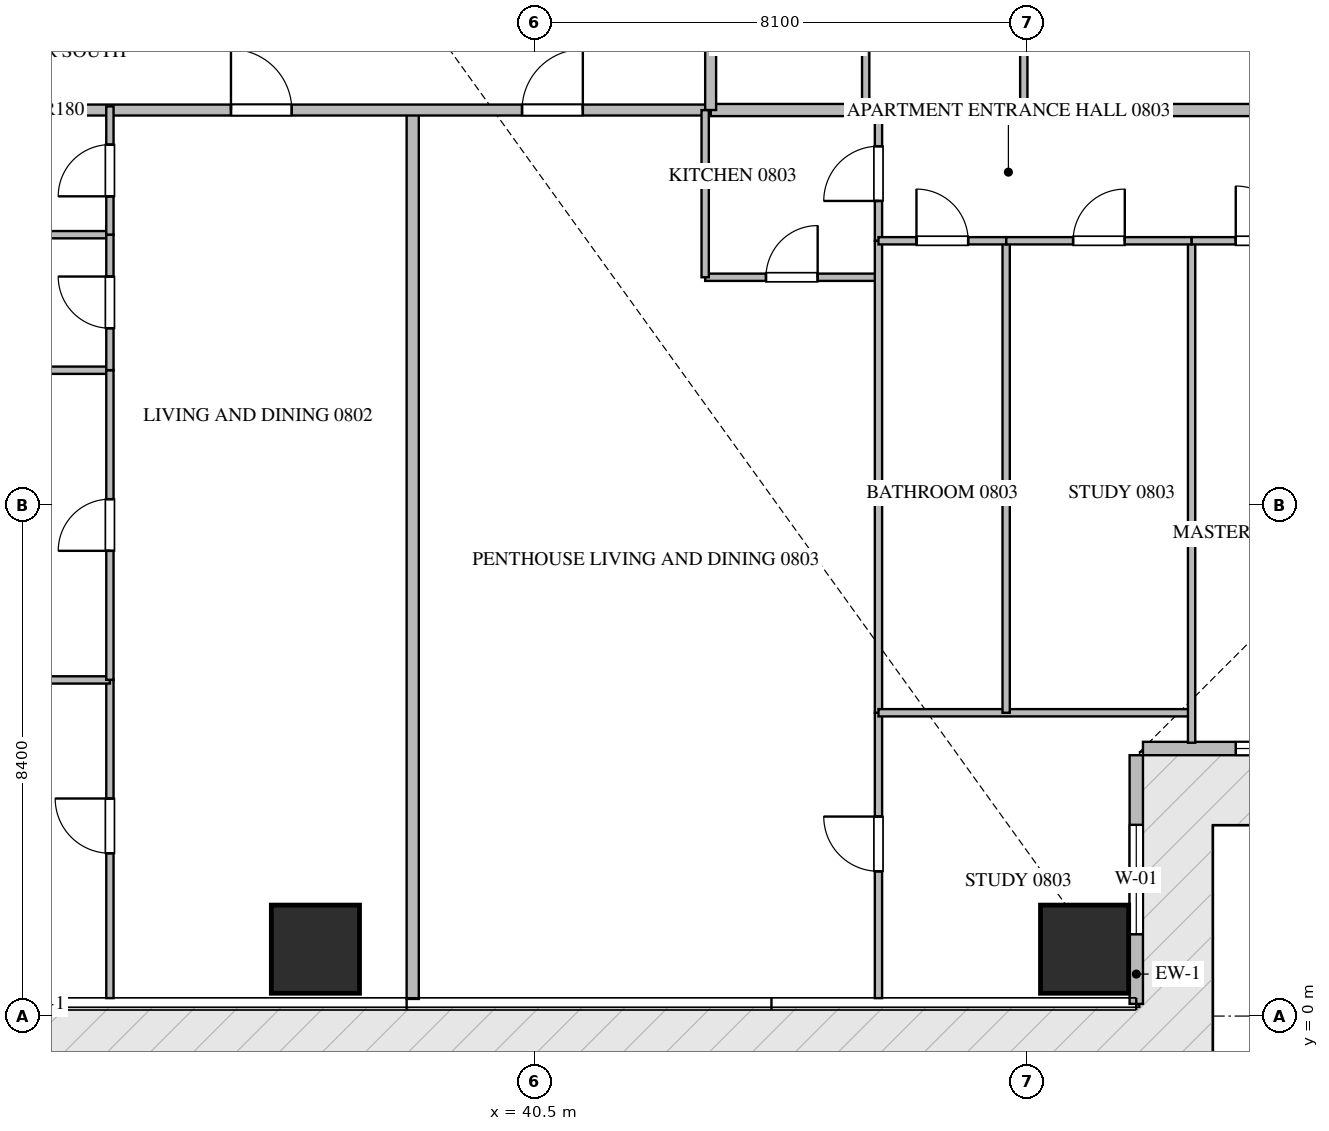
"""IFC4 building model, lengths in metres.
Left out: names, types, materials, properties, quantities, classifications, styles, units other than length and angle.
Written with IfcOpenShell. Run it as: python <this file> out.ifc"""

import sys

from ifc_helpers import new_model, si_unit, direction, frame, frame_2d, origin, origin_2d, place, context, subcontext, project, spatial, rectangle, extrude, source, transform, mapped, element, fill, save


model = new_model("IFC4")
c1 = context("Model", 3, precision=1e-05, world=origin(), true_north=direction((0.0, 1.0)))
c2 = subcontext(c1, "Body", "Model", "MODEL_VIEW")
j1 = project(units=[si_unit("LENGTHUNIT", "METRE"), si_unit("PLANEANGLEUNIT", "RADIAN")], contexts=[c1])
p1 = place(None, origin())
s1 = spatial("IfcSite", under=j1, at=p1, CompositionType="ELEMENT")
p2 = place(p1, origin())
s2 = spatial("IfcBuilding", under=s1, at=p2, CompositionType="ELEMENT")
p3 = place(p2, frame((0.0, 0.0, 37.95)))
s3 = spatial("IfcBuildingStorey", under=s2, at=p3, CompositionType="ELEMENT", Elevation=37.95)
m1 = source(origin(), c2, "Body", "SweptSolid", [
    extrude(rectangle(XDim=1.45, YDim=1.45, at=origin_2d()), origin(), (0.0, 0.0, 1.0), 3.75),
])
for number, where, z_axis, x_axis in (
    (1, (36.9, 1.1, -0.26), (0.0, 0.0, 1.0), (1.0, 0.0, 0.0)),
    (2, (49.55, 1.1, -0.26), (0.0, 0.0, 1.0), (1.0, 0.0, 0.0)),
):
    element("IfcColumn", number, at=place(p3, frame(where, z_axis=z_axis, x_axis=x_axis)), inside=s3, PredefinedType="COLUMN", context=c2, shape_type="MappedRepresentation", body=[
        mapped(m1, transform((0.0, 0.0, 0.0), scale=1.0)),
    ])
p4 = place(p3, frame((50.4, 0.2, 0.0), z_axis=(0.0, 0.0, 1.0), x_axis=(0.0, 1.0, 0.0)))
e3 = element("IfcWall", 3, at=p4, inside=s3, PredefinedType="ELEMENTEDWALL", context=c2, shape_type="SweptSolid", body=[
    extrude(rectangle(XDim=4.09, YDim=0.22, at=frame_2d((2.045, 0.0))), origin(), (0.0, 0.0, 1.0), 3.475),
])
p5 = place(p4, frame((1.145, 0.0, 0.65)))
e4 = element("IfcOpeningElement", 4, at=p5, cuts=e3, PredefinedType="OPENING", context=c2, shape_type="SweptSolid", body=[
    extrude(rectangle(XDim=1.8, YDim=2.1, at=frame_2d((0.9, 1.05))), frame((0.0, 0.12, 0.0), z_axis=(0.0, -1.0, 0.0), x_axis=(1.0, 0.0, 0.0)), (0.0, 0.0, 1.0), 0.24),
])
p6 = place(p3, frame((50.51, 4.4, 0.0), z_axis=(0.0, 0.0, 1.0), x_axis=(1.0, 0.0, 0.0)))
e5 = element("IfcWall", 5, at=p6, inside=s3, PredefinedType="ELEMENTEDWALL", context=c2, shape_type="SweptSolid", body=[
    extrude(rectangle(XDim=3.98, YDim=0.22, at=frame_2d((1.99, 0.0))), origin(), (0.0, 0.0, 1.0), 3.475),
])
p7 = place(p6, frame((1.526, 0.0, 0.65)))
e6 = element("IfcOpeningElement", 6, at=p7, cuts=e5, PredefinedType="OPENING", context=c2, shape_type="SweptSolid", body=[
    extrude(rectangle(XDim=1.8, YDim=2.1, at=frame_2d((0.9, 1.05))), frame((0.0, 0.12, 0.0), z_axis=(0.0, -1.0, 0.0), x_axis=(1.0, 0.0, 0.0)), (0.0, 0.0, 1.0), 0.24),
])
p8 = place(p3, frame((38.5, 0.282, 0.0), z_axis=(0.0, 0.0, 1.0), x_axis=(0.0, 1.0, 0.0)))
e7 = element("IfcWall", 7, at=p8, inside=s3, PredefinedType="PARTITIONING", context=c2, shape_type="SweptSolid", body=[
    extrude(rectangle(XDim=14.618, YDim=0.2, at=frame_2d((7.309, 0.0))), origin(), (0.0, 0.0, 1.0), 3.49),
])
p9 = place(p3, frame((43.4, 14.9, 0.0), z_axis=(0.0, 0.0, 1.0), x_axis=(1.0, 0.0, 0.0)))
e8 = element("IfcWall", 8, at=p9, inside=s3, PredefinedType="PARTITIONING", context=c2, shape_type="SweptSolid", body=[
    extrude(rectangle(XDim=15.318, YDim=0.2, at=frame_2d((7.659, 0.0))), origin(), (0.0, 0.0, 1.0), 3.49),
])
p10 = place(p3, frame((21.402, 14.9, 0.0), z_axis=(0.0, 0.0, 1.0), x_axis=(1.0, 0.0, 0.0)))
e9 = element("IfcWall", 9, at=p10, inside=s3, PredefinedType="PARTITIONING", context=c2, shape_type="SweptSolid", body=[
    extrude(rectangle(XDim=21.996, YDim=0.18, at=frame_2d((10.998, 0.0))), origin(), (0.0, 0.0, 1.0), 3.49),
])
p11 = place(p10, frame((2.1, 0.0, 0.0)))
e10 = element("IfcOpeningElement", 10, at=p11, cuts=e9, PredefinedType="OPENING", context=c2, shape_type="SweptSolid", body=[
    extrude(rectangle(XDim=1.0, YDim=2.15, at=frame_2d((0.5, 1.075))), frame((0.0, 0.1, 0.0), z_axis=(0.0, -1.0, 0.0), x_axis=(1.0, 0.0, 0.0)), (0.0, 0.0, 1.0), 0.2),
])
p12 = place(p10, frame((14.109, 0.0, 0.0)))
e11 = element("IfcOpeningElement", 11, at=p12, cuts=e9, PredefinedType="OPENING", context=c2, shape_type="SweptSolid", body=[
    extrude(rectangle(XDim=1.0, YDim=2.15, at=frame_2d((0.5, 1.075))), frame((0.0, 0.1, 0.0), z_axis=(0.0, -1.0, 0.0), x_axis=(1.0, 0.0, 0.0)), (0.0, 0.0, 1.0), 0.2),
])
p13 = place(p10, frame((18.896, 0.0, 0.0)))
e12 = element("IfcOpeningElement", 12, at=p13, cuts=e9, PredefinedType="OPENING", context=c2, shape_type="SweptSolid", body=[
    extrude(rectangle(XDim=1.0, YDim=2.15, at=frame_2d((0.5, 1.075))), frame((0.0, 0.1, 0.0), z_axis=(0.0, -1.0, 0.0), x_axis=(1.0, 0.0, 0.0)), (0.0, 0.0, 1.0), 0.2),
])
p14 = place(p3, frame((43.4, 14.9, 0.0), z_axis=(0.0, 0.0, 1.0), x_axis=(0.0, 1.0, 0.0)))
e13 = element("IfcWall", 13, at=p14, inside=s3, PredefinedType="PARTITIONING", context=c2, shape_type="SweptSolid", body=[
    extrude(rectangle(XDim=20.6, YDim=0.18, at=frame_2d((10.3, 0.0))), origin(), (0.0, 0.0, 1.0), 3.49),
])
p15 = place(p14, frame((5.723, 0.0, 0.0)))
e14 = element("IfcOpeningElement", 14, at=p15, cuts=e13, PredefinedType="OPENING", context=c2, shape_type="SweptSolid", body=[
    extrude(rectangle(XDim=1.0, YDim=2.15, at=frame_2d((0.5, 1.075))), frame((0.0, 0.1, 0.0), z_axis=(0.0, -1.0, 0.0), x_axis=(1.0, 0.0, 0.0)), (0.0, 0.0, 1.0), 0.2),
])
p16 = place(p14, frame((17.64, 0.0, 0.0)))
e15 = element("IfcOpeningElement", 15, at=p16, cuts=e13, PredefinedType="OPENING", context=c2, shape_type="SweptSolid", body=[
    extrude(rectangle(XDim=1.0, YDim=2.15, at=frame_2d((0.5, 1.075))), frame((0.0, 0.1, 0.0), z_axis=(0.0, -1.0, 0.0), x_axis=(1.0, 0.0, 0.0)), (0.0, 0.0, 1.0), 0.2),
])
p17 = place(p3, frame((33.52, 0.295, 0.0), z_axis=(0.0, 0.0, 1.0), x_axis=(0.0, 1.0, 0.0)))
e16 = element("IfcWall", 16, at=p17, inside=s3, PredefinedType="PARTITIONING", context=c2, shape_type="SweptSolid", body=[
    extrude(rectangle(XDim=5.233, YDim=0.12, at=frame_2d((2.617, 0.0))), origin(), (0.0, 0.0, 1.0), 3.49),
])
p18 = place(p17, frame((2.383, 0.0, 0.0)))
e17 = element("IfcOpeningElement", 17, at=p18, cuts=e16, PredefinedType="OPENING", context=c2, shape_type="SweptSolid", body=[
    extrude(rectangle(XDim=0.9, YDim=2.1, at=frame_2d((0.45, 1.05))), frame((0.0, 0.07, 0.0), z_axis=(0.0, -1.0, 0.0), x_axis=(1.0, 0.0, 0.0)), (0.0, 0.0, 1.0), 0.14),
])
for number, where, z_axis, x_axis in (
    (18, (25.34, 5.528, 0.0), (0.0, 0.0, 1.0), (1.0, 0.0, 0.0)),
    (19, (25.34, 10.621, 0.0), (0.0, 0.0, 1.0), (1.0, 0.0, 0.0)),
    (20, (25.34, 12.85, 0.0), (0.0, 0.0, 1.0), (1.0, 0.0, 0.0)),
):
    element("IfcWall", number, at=place(p3, frame(where, z_axis=z_axis, x_axis=x_axis)), inside=s3, PredefinedType="PARTITIONING", context=c2, shape_type="SweptSolid", body=[
        extrude(rectangle(XDim=8.18, YDim=0.12, at=frame_2d((4.09, 0.0))), origin(), (0.0, 0.0, 1.0), 3.49),
    ])
p19 = place(p3, frame((33.52, 5.53, 0.0), z_axis=(0.0, 0.0, 1.0), x_axis=(0.0, 1.0, 0.0)))
e21 = element("IfcWall", 21, at=p19, inside=s3, PredefinedType="PARTITIONING", context=c2, shape_type="SweptSolid", body=[
    extrude(rectangle(XDim=5.091, YDim=0.12, at=frame_2d((2.545, 0.0))), origin(), (0.0, 0.0, 1.0), 3.49),
])
p20 = place(p19, frame((2.121, 0.0, 0.0)))
e22 = element("IfcOpeningElement", 22, at=p20, cuts=e21, PredefinedType="OPENING", context=c2, shape_type="SweptSolid", body=[
    extrude(rectangle(XDim=0.85, YDim=2.1, at=frame_2d((0.425, 1.05))), frame((0.0, 0.07, 0.0), z_axis=(0.0, -1.0, 0.0), x_axis=(1.0, 0.0, 0.0)), (0.0, 0.0, 1.0), 0.14),
])
p21 = place(p3, frame((33.52, 10.623, 0.0), z_axis=(0.0, 0.0, 1.0), x_axis=(0.0, 1.0, 0.0)))
e23 = element("IfcWall", 23, at=p21, inside=s3, PredefinedType="PARTITIONING", context=c2, shape_type="SweptSolid", body=[
    extrude(rectangle(XDim=2.227, YDim=0.12, at=frame_2d((1.114, 0.0))), origin(), (0.0, 0.0, 1.0), 3.49),
])
p22 = place(p21, frame((0.689, 0.0, 0.0)))
e24 = element("IfcOpeningElement", 24, at=p22, cuts=e23, PredefinedType="OPENING", context=c2, shape_type="SweptSolid", body=[
    extrude(rectangle(XDim=0.85, YDim=2.1, at=frame_2d((0.425, 1.05))), frame((0.0, 0.07, 0.0), z_axis=(0.0, -1.0, 0.0), x_axis=(1.0, 0.0, 0.0)), (0.0, 0.0, 1.0), 0.14),
])
p23 = place(p3, frame((33.52, 12.852, 0.0), z_axis=(0.0, 0.0, 1.0), x_axis=(0.0, 1.0, 0.0)))
e25 = element("IfcWall", 25, at=p23, inside=s3, PredefinedType="PARTITIONING", context=c2, shape_type="SweptSolid", body=[
    extrude(rectangle(XDim=2.108, YDim=0.12, at=frame_2d((1.054, 0.0))), origin(), (0.0, 0.0, 1.0), 3.49),
])
p24 = place(p23, frame((0.629, 0.0, 0.0)))
e26 = element("IfcOpeningElement", 26, at=p24, cuts=e25, PredefinedType="OPENING", context=c2, shape_type="SweptSolid", body=[
    extrude(rectangle(XDim=0.85, YDim=2.1, at=frame_2d((0.425, 1.05))), frame((0.0, 0.07, 0.0), z_axis=(0.0, -1.0, 0.0), x_axis=(1.0, 0.0, 0.0)), (0.0, 0.0, 1.0), 0.14),
])
p25 = place(p3, frame((43.31, 12.15, 0.0), z_axis=(0.0, 0.0, 1.0), x_axis=(1.0, 0.0, 0.0)))
e27 = element("IfcWall", 27, at=p25, inside=s3, PredefinedType="PARTITIONING", context=c2, shape_type="SweptSolid", body=[
    extrude(rectangle(XDim=2.85, YDim=0.12, at=frame_2d((1.425, 0.0))), origin(), (0.0, 0.0, 1.0), 3.49),
])
p26 = place(p25, frame((1.0, 0.0, 0.0)))
e28 = element("IfcOpeningElement", 28, at=p26, cuts=e27, PredefinedType="OPENING", context=c2, shape_type="SweptSolid", body=[
    extrude(rectangle(XDim=0.85, YDim=2.1, at=frame_2d((0.425, 1.05))), frame((0.0, 0.07, 0.0), z_axis=(0.0, -1.0, 0.0), x_axis=(1.0, 0.0, 0.0)), (0.0, 0.0, 1.0), 0.14),
])
p27 = place(p3, frame((43.31, 12.15, 0.0), z_axis=(0.0, 0.0, 1.0), x_axis=(0.0, 1.0, 0.0)))
e29 = element("IfcWall", 29, at=p27, inside=s3, PredefinedType="PARTITIONING", context=c2, shape_type="SweptSolid", body=[
    extrude(rectangle(XDim=2.748, YDim=0.12, at=frame_2d((1.374, 0.0))), origin(), (0.0, 0.0, 1.0), 3.49),
])
p28 = place(p3, frame((46.16, 12.75, 0.0), z_axis=(0.0, 0.0, 1.0), x_axis=(0.0, 1.0, 0.0)))
e30 = element("IfcWall", 30, at=p28, inside=s3, PredefinedType="PARTITIONING", context=c2, shape_type="SweptSolid", body=[
    extrude(rectangle(XDim=2.21, YDim=0.12, at=frame_2d((1.105, 0.0))), origin(), (0.0, 0.0, 1.0), 3.49),
])
p29 = place(p28, frame((0.655, 0.0, 0.0)))
e31 = element("IfcOpeningElement", 31, at=p29, cuts=e30, PredefinedType="OPENING", context=c2, shape_type="SweptSolid", body=[
    extrude(rectangle(XDim=0.9, YDim=2.1, at=frame_2d((0.45, 1.05))), frame((0.0, 0.07, 0.0), z_axis=(0.0, -1.0, 0.0), x_axis=(1.0, 0.0, 0.0)), (0.0, 0.0, 1.0), 0.14),
])
p30 = place(p3, frame((46.16, 0.295, 0.0), z_axis=(0.0, 0.0, 1.0), x_axis=(0.0, 1.0, 0.0)))
e32 = element("IfcWall", 32, at=p30, inside=s3, PredefinedType="PARTITIONING", context=c2, shape_type="SweptSolid", body=[
    extrude(rectangle(XDim=4.693, YDim=0.12, at=frame_2d((2.347, 0.0))), origin(), (0.0, 0.0, 1.0), 3.49),
])
p31 = place(p30, frame((2.086, 0.0, 0.0)))
e33 = element("IfcOpeningElement", 33, at=p31, cuts=e32, PredefinedType="OPENING", context=c2, shape_type="SweptSolid", body=[
    extrude(rectangle(XDim=0.9, YDim=2.1, at=frame_2d((0.45, 1.05))), frame((0.0, 0.07, 0.0), z_axis=(0.0, -1.0, 0.0), x_axis=(1.0, 0.0, 0.0)), (0.0, 0.0, 1.0), 0.14),
])
p32 = place(p3, frame((46.16, 4.99, 0.0), z_axis=(0.0, 0.0, 1.0), x_axis=(0.0, 1.0, 0.0)))
e34 = element("IfcWall", 34, at=p32, inside=s3, PredefinedType="PARTITIONING", context=c2, shape_type="SweptSolid", body=[
    extrude(rectangle(XDim=7.758, YDim=0.12, at=frame_2d((3.879, 0.0))), origin(), (0.0, 0.0, 1.0), 3.49),
])
p33 = place(p3, frame((46.16, 4.988, 0.0), z_axis=(0.0, 0.0, 1.0), x_axis=(1.0, 0.0, 0.0)))
e35 = element("IfcWall", 35, at=p33, inside=s3, PredefinedType="PARTITIONING", context=c2, shape_type="SweptSolid", body=[
    extrude(rectangle(XDim=5.15, YDim=0.12, at=frame_2d((2.575, 0.0))), origin(), (0.0, 0.0, 1.0), 3.49),
])
p34 = place(p3, frame((51.31, 4.495, 0.0), z_axis=(0.0, 0.0, 1.0), x_axis=(0.0, 1.0, 0.0)))
e36 = element("IfcWall", 36, at=p34, inside=s3, PredefinedType="PARTITIONING", context=c2, shape_type="SweptSolid", body=[
    extrude(rectangle(XDim=8.255, YDim=0.12, at=frame_2d((4.127, 0.0))), origin(), (0.0, 0.0, 1.0), 3.49),
])
p35 = place(p3, frame((48.26, 4.988, 0.0), z_axis=(0.0, 0.0, 1.0), x_axis=(0.0, 1.0, 0.0)))
e37 = element("IfcWall", 37, at=p35, inside=s3, PredefinedType="PARTITIONING", context=c2, shape_type="SweptSolid", body=[
    extrude(rectangle(XDim=7.762, YDim=0.12, at=frame_2d((3.881, 0.0))), origin(), (0.0, 0.0, 1.0), 3.49),
])
p36 = place(p3, frame((46.16, 12.75, 0.0), z_axis=(0.0, 0.0, 1.0), x_axis=(1.0, 0.0, 0.0)))
e38 = element("IfcWall", 38, at=p36, inside=s3, PredefinedType="PARTITIONING", context=c2, shape_type="SweptSolid", body=[
    extrude(rectangle(XDim=2.1, YDim=0.12, at=frame_2d((1.05, 0.0))), origin(), (0.0, 0.0, 1.0), 3.49),
])
p37 = place(p36, frame((0.625, 0.0, 0.0)))
e39 = element("IfcOpeningElement", 39, at=p37, cuts=e38, PredefinedType="OPENING", context=c2, shape_type="SweptSolid", body=[
    extrude(rectangle(XDim=0.85, YDim=2.1, at=frame_2d((0.425, 1.05))), frame((0.0, 0.07, 0.0), z_axis=(0.0, -1.0, 0.0), x_axis=(1.0, 0.0, 0.0)), (0.0, 0.0, 1.0), 0.14),
])
p38 = place(p3, frame((48.262, 12.75, 0.0), z_axis=(0.0, 0.0, 1.0), x_axis=(1.0, 0.0, 0.0)))
e40 = element("IfcWall", 40, at=p38, inside=s3, PredefinedType="PARTITIONING", context=c2, shape_type="SweptSolid", body=[
    extrude(rectangle(XDim=3.048, YDim=0.12, at=frame_2d((1.524, 0.0))), origin(), (0.0, 0.0, 1.0), 3.49),
])
p39 = place(p38, frame((1.099, 0.0, 0.0)))
e41 = element("IfcOpeningElement", 41, at=p39, cuts=e40, PredefinedType="OPENING", context=c2, shape_type="SweptSolid", body=[
    extrude(rectangle(XDim=0.85, YDim=2.1, at=frame_2d((0.425, 1.05))), frame((0.0, 0.07, 0.0), z_axis=(0.0, -1.0, 0.0), x_axis=(1.0, 0.0, 0.0)), (0.0, 0.0, 1.0), 0.14),
])
p40 = place(p3, frame((51.312, 12.75, 0.0), z_axis=(0.0, 0.0, 1.0), x_axis=(1.0, 0.0, 0.0)))
e42 = element("IfcWall", 42, at=p40, inside=s3, PredefinedType="PARTITIONING", context=c2, shape_type="SweptSolid", body=[
    extrude(rectangle(XDim=2.348, YDim=0.12, at=frame_2d((1.174, 0.0))), origin(), (0.0, 0.0, 1.0), 3.49),
])
p41 = place(p40, frame((0.724, 0.0, 0.0)))
e43 = element("IfcOpeningElement", 43, at=p41, cuts=e42, PredefinedType="OPENING", context=c2, shape_type="SweptSolid", body=[
    extrude(rectangle(XDim=0.9, YDim=2.1, at=frame_2d((0.45, 1.05))), frame((0.0, 0.07, 0.0), z_axis=(0.0, -1.0, 0.0), x_axis=(1.0, 0.0, 0.0)), (0.0, 0.0, 1.0), 0.14),
])
for number, where, z_axis, x_axis in (
    (44, (45.95, 14.84, 0.0), (0.0, 0.0, 1.0), (0.0, 1.0, 0.0)),
    (45, (48.55, 14.84, 0.0), (0.0, 0.0, 1.0), (0.0, 1.0, 0.0)),
):
    element("IfcWall", number, at=place(p3, frame(where, z_axis=z_axis, x_axis=x_axis)), inside=s3, PredefinedType="PARTITIONING", context=c2, shape_type="SweptSolid", body=[
        extrude(rectangle(XDim=2.81, YDim=0.12, at=frame_2d((1.405, 0.0))), origin(), (0.0, 0.0, 1.0), 3.49),
    ])
m2 = source(origin(), c2, "Body", "SweptSolid", [
    extrude(rectangle(XDim=1.8, YDim=2.1, at=frame_2d((0.9, 1.05))), frame((0.0, 0.03, 0.0), z_axis=(0.0, -1.0, 0.0), x_axis=(1.0, 0.0, 0.0)), (0.0, 0.0, 1.0), 0.06),
])
p42 = place(p5, origin())
e46 = element("IfcWindow", 46, at=p42, inside=s3, PartitioningType="SINGLE_PANEL", PredefinedType="WINDOW", context=c2, shape_type="MappedRepresentation", body=[
    mapped(m2, transform((0.0, 0.0, 0.0), scale=1.0)),
])
fill(e4, e46)
p43 = place(p7, origin())
e47 = element("IfcWindow", 47, at=p43, inside=s3, PartitioningType="SINGLE_PANEL", PredefinedType="WINDOW", context=c2, shape_type="MappedRepresentation", body=[
    mapped(m2, transform((0.0, 0.0, 0.0), scale=1.0)),
])
fill(e6, e47)
m3 = source(origin(), c2, "Body", "SweptSolid", [
    extrude(rectangle(XDim=1.0, YDim=2.15, at=frame_2d((0.5, 1.075))), frame((0.0, 0.025, 0.0), z_axis=(0.0, -1.0, 0.0), x_axis=(1.0, 0.0, 0.0)), (0.0, 0.0, 1.0), 0.05),
])
p44 = place(p12, origin())
e48 = element("IfcDoor", 48, at=p44, inside=s3, OperationType="SINGLE_SWING_LEFT", PredefinedType="DOOR", context=c2, shape_type="MappedRepresentation", body=[
    mapped(m3, transform((0.0, 0.0, 0.0), scale=1.0)),
])
fill(e11, e48)
p45 = place(p13, origin())
e49 = element("IfcDoor", 49, at=p45, inside=s3, OperationType="SINGLE_SWING_RIGHT", PredefinedType="DOOR", context=c2, shape_type="MappedRepresentation", body=[
    mapped(m3, transform((0.0, 0.0, 0.0), scale=1.0)),
])
fill(e12, e49)
m4 = source(origin(), c2, "Body", "SweptSolid", [
    extrude(rectangle(XDim=0.9, YDim=2.1, at=frame_2d((0.45, 1.05))), frame((0.0, 0.025, 0.0), z_axis=(0.0, -1.0, 0.0), x_axis=(1.0, 0.0, 0.0)), (0.0, 0.0, 1.0), 0.05),
])
p46 = place(p18, origin())
e50 = element("IfcDoor", 50, at=p46, inside=s3, OperationType="SINGLE_SWING_RIGHT", PredefinedType="DOOR", context=c2, shape_type="MappedRepresentation", body=[
    mapped(m4, transform((0.0, 0.0, 0.0), scale=1.0)),
])
fill(e17, e50)
m5 = source(origin(), c2, "Body", "SweptSolid", [
    extrude(rectangle(XDim=0.85, YDim=2.1, at=frame_2d((0.425, 1.05))), frame((0.0, 0.025, 0.0), z_axis=(0.0, -1.0, 0.0), x_axis=(1.0, 0.0, 0.0)), (0.0, 0.0, 1.0), 0.05),
])
p47 = place(p20, origin())
e51 = element("IfcDoor", 51, at=p47, inside=s3, OperationType="SINGLE_SWING_LEFT", PredefinedType="DOOR", context=c2, shape_type="MappedRepresentation", body=[
    mapped(m5, transform((0.0, 0.0, 0.0), scale=1.0)),
])
fill(e22, e51)
p48 = place(p22, origin())
e52 = element("IfcDoor", 52, at=p48, inside=s3, OperationType="SINGLE_SWING_RIGHT", PredefinedType="DOOR", context=c2, shape_type="MappedRepresentation", body=[
    mapped(m5, transform((0.0, 0.0, 0.0), scale=1.0)),
])
fill(e24, e52)
p49 = place(p24, origin())
e53 = element("IfcDoor", 53, at=p49, inside=s3, OperationType="SINGLE_SWING_LEFT", PredefinedType="DOOR", context=c2, shape_type="MappedRepresentation", body=[
    mapped(m5, transform((0.0, 0.0, 0.0), scale=1.0)),
])
fill(e26, e53)
p50 = place(p26, origin())
e54 = element("IfcDoor", 54, at=p50, inside=s3, OperationType="SINGLE_SWING_RIGHT", PredefinedType="DOOR", context=c2, shape_type="MappedRepresentation", body=[
    mapped(m5, transform((0.0, 0.0, 0.0), scale=1.0)),
])
fill(e28, e54)
p51 = place(p29, origin())
e55 = element("IfcDoor", 55, at=p51, inside=s3, OperationType="SINGLE_SWING_LEFT", PredefinedType="DOOR", context=c2, shape_type="MappedRepresentation", body=[
    mapped(m4, transform((0.0, 0.0, 0.0), scale=1.0)),
])
fill(e31, e55)
p52 = place(p31, origin())
e56 = element("IfcDoor", 56, at=p52, inside=s3, OperationType="SINGLE_SWING_RIGHT", PredefinedType="DOOR", context=c2, shape_type="MappedRepresentation", body=[
    mapped(m4, transform((0.0, 0.0, 0.0), scale=1.0)),
])
fill(e33, e56)
p53 = place(p37, origin())
e57 = element("IfcDoor", 57, at=p53, inside=s3, OperationType="SINGLE_SWING_LEFT", PredefinedType="DOOR", context=c2, shape_type="MappedRepresentation", body=[
    mapped(m5, transform((0.0, 0.0, 0.0), scale=1.0)),
])
fill(e39, e57)
p54 = place(p39, origin())
e58 = element("IfcDoor", 58, at=p54, inside=s3, OperationType="SINGLE_SWING_RIGHT", PredefinedType="DOOR", context=c2, shape_type="MappedRepresentation", body=[
    mapped(m5, transform((0.0, 0.0, 0.0), scale=1.0)),
])
fill(e41, e58)
p55 = place(p41, origin())
e59 = element("IfcDoor", 59, at=p55, inside=s3, OperationType="SINGLE_SWING_LEFT", PredefinedType="DOOR", context=c2, shape_type="MappedRepresentation", body=[
    mapped(m4, transform((0.0, 0.0, 0.0), scale=1.0)),
])
fill(e43, e59)
save(model, sys.argv[1])
